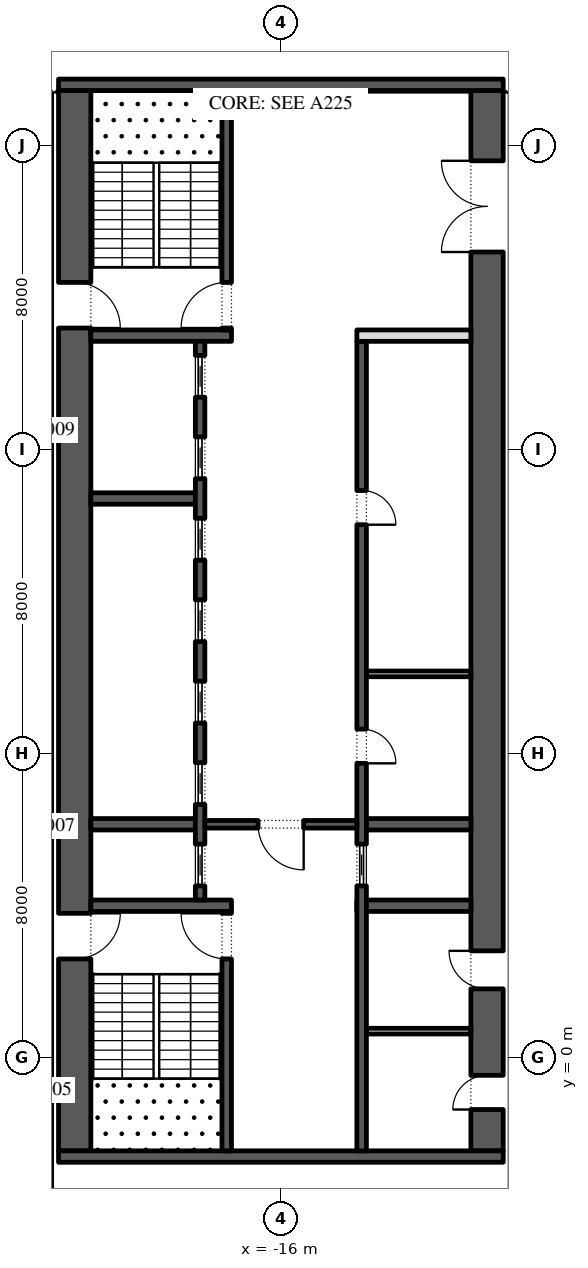
"""IFC4 building model, lengths in metres.
Left out: names, types, materials, properties, quantities, classifications, styles, units other than length and angle.
Written with IfcOpenShell. Run it as: python <this file> out.ifc"""

import sys

from ifc_helpers import new_model, si_unit, direction, frame, frame_2d, origin, place, context, subcontext, project, spatial, rectangle, extrude, element, fill, save


model = new_model("IFC4")
c1 = context("Model", 3, precision=1e-05, world=origin(), true_north=direction((0.0, 1.0)))
c2 = subcontext(c1, "Body", "Model", "MODEL_VIEW")
j1 = project(units=[si_unit("LENGTHUNIT", "METRE"), si_unit("PLANEANGLEUNIT", "RADIAN")], contexts=[c1])
p1 = place(None, origin())
s1 = spatial("IfcSite", under=j1, at=p1, CompositionType="ELEMENT")
p2 = place(p1, origin())
s2 = spatial("IfcBuilding", under=s1, at=p2, CompositionType="ELEMENT")
p3 = place(p2, frame((0.0, 0.0, 105.6)))
s3 = spatial("IfcBuildingStorey", under=s2, at=p3, CompositionType="ELEMENT", Elevation=105.6)
p4 = place(p3, frame((-21.425, -2.45, 0.0), z_axis=(0.0, 0.0, 1.0), x_axis=(0.0, 1.0, 0.0)))
e1 = element("IfcWall", 1, at=p4, inside=s3, PredefinedType="SHEAR", context=c2, shape_type="SweptSolid", body=[
    extrude(rectangle(XDim=27.9, YDim=0.85, at=frame_2d((13.95, 0.0))), origin(), (0.0, 0.0, 1.0), 4.0),
])
p5 = place(p4, frame((5.05, 0.0, 0.0)))
e2 = element("IfcOpeningElement", 2, at=p5, cuts=e1, PredefinedType="OPENING", context=c2, shape_type="SweptSolid", body=[
    extrude(rectangle(XDim=1.2, YDim=2.1, at=frame_2d((0.6, 1.05))), frame((0.0, 0.435, 0.0), z_axis=(0.0, -1.0, 0.0), x_axis=(1.0, 0.0, 0.0)), (0.0, 0.0, 1.0), 0.87),
])
p6 = place(p4, frame((21.65, 0.0, 0.0)))
e3 = element("IfcOpeningElement", 3, at=p6, cuts=e1, PredefinedType="OPENING", context=c2, shape_type="SweptSolid", body=[
    extrude(rectangle(XDim=1.2, YDim=2.1, at=frame_2d((0.6, 1.05))), frame((0.0, 0.435, 0.0), z_axis=(0.0, -1.0, 0.0), x_axis=(1.0, 0.0, 0.0)), (0.0, 0.0, 1.0), 0.87),
])
p7 = place(p3, frame((-10.575, -2.45, 0.0), z_axis=(0.0, 0.0, 1.0), x_axis=(0.0, 1.0, 0.0)))
e4 = element("IfcWall", 4, at=p7, inside=s3, PredefinedType="SHEAR", context=c2, shape_type="SweptSolid", body=[
    extrude(rectangle(XDim=27.9, YDim=0.85, at=frame_2d((13.95, 0.0))), origin(), (0.0, 0.0, 1.0), 4.0),
])
p8 = place(p7, frame((23.65, 0.0, 0.0)))
e5 = element("IfcOpeningElement", 5, at=p8, cuts=e4, PredefinedType="OPENING", context=c2, shape_type="SweptSolid", body=[
    extrude(rectangle(XDim=2.4, YDim=2.1, at=frame_2d((1.2, 1.05))), frame((0.0, 0.435, 0.0), z_axis=(0.0, -1.0, 0.0), x_axis=(1.0, 0.0, 0.0)), (0.0, 0.0, 1.0), 0.87),
])
p9 = place(p7, frame((1.087, 0.0, 0.0)))
e6 = element("IfcOpeningElement", 6, at=p9, cuts=e4, PredefinedType="OPENING", context=c2, shape_type="SweptSolid", body=[
    extrude(rectangle(XDim=0.9, YDim=2.1, at=frame_2d((0.45, 1.05))), frame((0.0, 0.435, 0.0), z_axis=(0.0, -1.0, 0.0), x_axis=(1.0, 0.0, 0.0)), (0.0, 0.0, 1.0), 0.87),
])
p10 = place(p7, frame((4.262, 0.0, 0.0)))
e7 = element("IfcOpeningElement", 7, at=p10, cuts=e4, PredefinedType="OPENING", context=c2, shape_type="SweptSolid", body=[
    extrude(rectangle(XDim=1.0, YDim=2.1, at=frame_2d((0.5, 1.05))), frame((0.0, 0.435, 0.0), z_axis=(0.0, -1.0, 0.0), x_axis=(1.0, 0.0, 0.0)), (0.0, 0.0, 1.0), 0.87),
])
for number, where, z_axis, x_axis in (
    (8, (-21.85, -2.6, 0.0), (0.0, 0.0, 1.0), (1.0, 0.0, 0.0)),
    (9, (-21.85, 25.6, 0.0), (0.0, 0.0, 1.0), (1.0, 0.0, 0.0)),
):
    element("IfcWall", number, at=place(p3, frame(where, z_axis=z_axis, x_axis=x_axis)), inside=s3, PredefinedType="SHEAR", context=c2, shape_type="SweptSolid", body=[
        extrude(rectangle(XDim=11.7, YDim=0.3, at=frame_2d((5.85, 0.0))), origin(), (0.0, 0.0, 1.0), 4.0),
    ])
p11 = place(p3, frame((-21.0, 4.0, 0.0), z_axis=(0.0, 0.0, 1.0), x_axis=(1.0, 0.0, 0.0)))
e10 = element("IfcWall", 10, at=p11, inside=s3, PredefinedType="SHEAR", context=c2, shape_type="SweptSolid", body=[
    extrude(rectangle(XDim=3.7, YDim=0.3, at=frame_2d((1.85, 0.0))), origin(), (0.0, 0.0, 1.0), 4.0),
])
p12 = place(p3, frame((-17.425, -2.45, 0.0), z_axis=(0.0, 0.0, 1.0), x_axis=(0.0, 1.0, 0.0)))
e11 = element("IfcWall", 11, at=p12, inside=s3, PredefinedType="SHEAR", context=c2, shape_type="SweptSolid", body=[
    extrude(rectangle(XDim=6.3, YDim=0.25, at=frame_2d((3.15, 0.0))), origin(), (0.0, 0.0, 1.0), 4.0),
])
p13 = place(p12, frame((5.05, 0.0, 0.0)))
e12 = element("IfcOpeningElement", 12, at=p13, cuts=e11, PredefinedType="OPENING", context=c2, shape_type="SweptSolid", body=[
    extrude(rectangle(XDim=1.2, YDim=2.1, at=frame_2d((0.6, 1.05))), frame((0.0, 0.135, 0.0), z_axis=(0.0, -1.0, 0.0), x_axis=(1.0, 0.0, 0.0)), (0.0, 0.0, 1.0), 0.27),
])
p14 = place(p3, frame((-21.0, 19.0, 0.0), z_axis=(0.0, 0.0, 1.0), x_axis=(1.0, 0.0, 0.0)))
e13 = element("IfcWall", 13, at=p14, inside=s3, PredefinedType="SHEAR", context=c2, shape_type="SweptSolid", body=[
    extrude(rectangle(XDim=3.7, YDim=0.3, at=frame_2d((1.85, 0.0))), origin(), (0.0, 0.0, 1.0), 4.0),
])
p15 = place(p3, frame((-17.425, 19.15, 0.0), z_axis=(0.0, 0.0, 1.0), x_axis=(0.0, 1.0, 0.0)))
e14 = element("IfcWall", 14, at=p15, inside=s3, PredefinedType="SHEAR", context=c2, shape_type="SweptSolid", body=[
    extrude(rectangle(XDim=6.3, YDim=0.25, at=frame_2d((3.15, 0.0))), origin(), (0.0, 0.0, 1.0), 4.0),
])
p16 = place(p15, frame((0.05, 0.0, 0.0)))
e15 = element("IfcOpeningElement", 15, at=p16, cuts=e14, PredefinedType="OPENING", context=c2, shape_type="SweptSolid", body=[
    extrude(rectangle(XDim=1.2, YDim=2.1, at=frame_2d((0.6, 1.05))), frame((0.0, 0.135, 0.0), z_axis=(0.0, -1.0, 0.0), x_axis=(1.0, 0.0, 0.0)), (0.0, 0.0, 1.0), 0.27),
])
for number, where, z_axis, x_axis in (
    (16, (-21.0, 6.143, 0.0), (0.0, 0.0, 1.0), (1.0, 0.0, 0.0)),
    (17, (-21.0, 14.714, 0.0), (0.0, 0.0, 1.0), (1.0, 0.0, 0.0)),
):
    element("IfcWall", number, at=place(p3, frame(where, z_axis=z_axis, x_axis=x_axis)), inside=s3, PredefinedType="SHEAR", context=c2, shape_type="SweptSolid", body=[
        extrude(rectangle(XDim=2.75, YDim=0.3, at=frame_2d((1.375, 0.0))), origin(), (0.0, 0.0, 1.0), 4.0),
    ])
p17 = place(p3, frame((-18.125, 4.15, 0.0), z_axis=(0.0, 0.0, 1.0), x_axis=(0.0, 1.0, 0.0)))
e18 = element("IfcWall", 18, at=p17, inside=s3, PredefinedType="SHEAR", context=c2, shape_type="SweptSolid", body=[
    extrude(rectangle(XDim=14.7, YDim=0.25, at=frame_2d((7.35, 0.0))), origin(), (0.0, 0.0, 1.0), 4.0),
])
p18 = place(p17, frame((0.371, 0.0, 0.0)))
e19 = element("IfcOpeningElement", 19, at=p18, cuts=e18, PredefinedType="OPENING", context=c2, shape_type="SweptSolid", body=[
    extrude(rectangle(XDim=1.1, YDim=2.1, at=frame_2d((0.55, 1.05))), frame((0.0, 0.135, 0.0), z_axis=(0.0, -1.0, 0.0), x_axis=(1.0, 0.0, 0.0)), (0.0, 0.0, 1.0), 0.27),
])
p19 = place(p17, frame((2.514, 0.0, 0.0)))
e20 = element("IfcOpeningElement", 20, at=p19, cuts=e18, PredefinedType="OPENING", context=c2, shape_type="SweptSolid", body=[
    extrude(rectangle(XDim=1.1, YDim=2.1, at=frame_2d((0.55, 1.05))), frame((0.0, 0.135, 0.0), z_axis=(0.0, -1.0, 0.0), x_axis=(1.0, 0.0, 0.0)), (0.0, 0.0, 1.0), 0.27),
])
p20 = place(p17, frame((4.657, 0.0, 0.0)))
e21 = element("IfcOpeningElement", 21, at=p20, cuts=e18, PredefinedType="OPENING", context=c2, shape_type="SweptSolid", body=[
    extrude(rectangle(XDim=1.1, YDim=2.1, at=frame_2d((0.55, 1.05))), frame((0.0, 0.135, 0.0), z_axis=(0.0, -1.0, 0.0), x_axis=(1.0, 0.0, 0.0)), (0.0, 0.0, 1.0), 0.27),
])
p21 = place(p17, frame((6.8, 0.0, 0.0)))
e22 = element("IfcOpeningElement", 22, at=p21, cuts=e18, PredefinedType="OPENING", context=c2, shape_type="SweptSolid", body=[
    extrude(rectangle(XDim=1.1, YDim=2.1, at=frame_2d((0.55, 1.05))), frame((0.0, 0.135, 0.0), z_axis=(0.0, -1.0, 0.0), x_axis=(1.0, 0.0, 0.0)), (0.0, 0.0, 1.0), 0.27),
])
p22 = place(p17, frame((8.943, 0.0, 0.0)))
e23 = element("IfcOpeningElement", 23, at=p22, cuts=e18, PredefinedType="OPENING", context=c2, shape_type="SweptSolid", body=[
    extrude(rectangle(XDim=1.1, YDim=2.1, at=frame_2d((0.55, 1.05))), frame((0.0, 0.135, 0.0), z_axis=(0.0, -1.0, 0.0), x_axis=(1.0, 0.0, 0.0)), (0.0, 0.0, 1.0), 0.27),
])
p23 = place(p17, frame((11.086, 0.0, 0.0)))
e24 = element("IfcOpeningElement", 24, at=p23, cuts=e18, PredefinedType="OPENING", context=c2, shape_type="SweptSolid", body=[
    extrude(rectangle(XDim=1.1, YDim=2.1, at=frame_2d((0.55, 1.05))), frame((0.0, 0.135, 0.0), z_axis=(0.0, -1.0, 0.0), x_axis=(1.0, 0.0, 0.0)), (0.0, 0.0, 1.0), 0.27),
])
p24 = place(p17, frame((13.229, 0.0, 0.0)))
e25 = element("IfcOpeningElement", 25, at=p24, cuts=e18, PredefinedType="OPENING", context=c2, shape_type="SweptSolid", body=[
    extrude(rectangle(XDim=1.1, YDim=2.1, at=frame_2d((0.55, 1.05))), frame((0.0, 0.135, 0.0), z_axis=(0.0, -1.0, 0.0), x_axis=(1.0, 0.0, 0.0)), (0.0, 0.0, 1.0), 0.27),
])
p25 = place(p3, frame((-14.0, 4.0, 0.0), z_axis=(0.0, 0.0, 1.0), x_axis=(1.0, 0.0, 0.0)))
e26 = element("IfcWall", 26, at=p25, inside=s3, PredefinedType="SHEAR", context=c2, shape_type="SweptSolid", body=[
    extrude(rectangle(XDim=3.0, YDim=0.3, at=frame_2d((1.5, 0.0))), origin(), (0.0, 0.0, 1.0), 4.0),
])
p26 = place(p3, frame((-13.75, 6.143, 0.0), z_axis=(0.0, 0.0, 1.0), x_axis=(1.0, 0.0, 0.0)))
e27 = element("IfcWall", 27, at=p26, inside=s3, PredefinedType="SHEAR", context=c2, shape_type="SweptSolid", body=[
    extrude(rectangle(XDim=2.75, YDim=0.3, at=frame_2d((1.375, 0.0))), origin(), (0.0, 0.0, 1.0), 4.0),
])
p27 = place(p3, frame((-13.875, -2.45, 0.0), z_axis=(0.0, 0.0, 1.0), x_axis=(0.0, 1.0, 0.0)))
e28 = element("IfcWall", 28, at=p27, inside=s3, PredefinedType="SHEAR", context=c2, shape_type="SweptSolid", body=[
    extrude(rectangle(XDim=21.3, YDim=0.25, at=frame_2d((10.65, 0.0))), origin(), (0.0, 0.0, 1.0), 4.0),
])
p28 = place(p27, frame((10.196, 0.0, 0.0)))
e29 = element("IfcOpeningElement", 29, at=p28, cuts=e28, PredefinedType="OPENING", context=c2, shape_type="SweptSolid", body=[
    extrude(rectangle(XDim=0.9, YDim=2.1, at=frame_2d((0.45, 1.05))), frame((0.0, 0.135, 0.0), z_axis=(0.0, -1.0, 0.0), x_axis=(1.0, 0.0, 0.0)), (0.0, 0.0, 1.0), 0.27),
])
p29 = place(p27, frame((16.475, 0.0, 0.0)))
e30 = element("IfcOpeningElement", 30, at=p29, cuts=e28, PredefinedType="OPENING", context=c2, shape_type="SweptSolid", body=[
    extrude(rectangle(XDim=0.9, YDim=2.1, at=frame_2d((0.45, 1.05))), frame((0.0, 0.135, 0.0), z_axis=(0.0, -1.0, 0.0), x_axis=(1.0, 0.0, 0.0)), (0.0, 0.0, 1.0), 0.27),
])
p30 = place(p27, frame((6.971, 0.0, 0.0)))
e31 = element("IfcOpeningElement", 31, at=p30, cuts=e28, PredefinedType="OPENING", context=c2, shape_type="SweptSolid", body=[
    extrude(rectangle(XDim=1.1, YDim=2.1, at=frame_2d((0.55, 1.05))), frame((0.0, 0.135, 0.0), z_axis=(0.0, -1.0, 0.0), x_axis=(1.0, 0.0, 0.0)), (0.0, 0.0, 1.0), 0.27),
])
p31 = place(p3, frame((-14.0, 19.0, 0.0), z_axis=(0.0, 0.0, 1.0), x_axis=(1.0, 0.0, 0.0)))
e32 = element("IfcWall", 32, at=p31, inside=s3, PredefinedType="PARTITIONING", context=c2, shape_type="SweptSolid", body=[
    extrude(rectangle(XDim=3.0, YDim=0.3, at=frame_2d((1.5, 0.0))), origin(), (0.0, 0.0, 1.0), 4.0),
])
p32 = place(p3, frame((-13.75, 10.1, 0.0), z_axis=(0.0, 0.0, 1.0), x_axis=(1.0, 0.0, 0.0)))
e33 = element("IfcWall", 33, at=p32, inside=s3, PredefinedType="PARTITIONING", context=c2, shape_type="SweptSolid", body=[
    extrude(rectangle(XDim=2.75, YDim=0.15, at=frame_2d((1.375, 0.0))), origin(), (0.0, 0.0, 1.0), 4.0),
])
p33 = place(p3, frame((-18.0, 6.143, 0.0), z_axis=(0.0, 0.0, 1.0), x_axis=(1.0, 0.0, 0.0)))
e34 = element("IfcWall", 34, at=p33, inside=s3, PredefinedType="SHEAR", context=c2, shape_type="SweptSolid", body=[
    extrude(rectangle(XDim=4.0, YDim=0.2, at=frame_2d((2.0, 0.0))), origin(), (0.0, 0.0, 1.0), 4.0),
])
p34 = place(p33, frame((1.4, 0.0, 0.0)))
e35 = element("IfcOpeningElement", 35, at=p34, cuts=e34, PredefinedType="OPENING", context=c2, shape_type="SweptSolid", body=[
    extrude(rectangle(XDim=1.2, YDim=2.1, at=frame_2d((0.6, 1.05))), frame((0.0, 0.11, 0.0), z_axis=(0.0, -1.0, 0.0), x_axis=(1.0, 0.0, 0.0)), (0.0, 0.0, 1.0), 0.22),
])
p35 = place(p3, frame((-13.75, 0.7, 0.0), z_axis=(0.0, 0.0, 1.0), x_axis=(1.0, 0.0, 0.0)))
e36 = element("IfcWall", 36, at=p35, inside=s3, PredefinedType="PARTITIONING", context=c2, shape_type="SweptSolid", body=[
    extrude(rectangle(XDim=2.75, YDim=0.15, at=frame_2d((1.375, 0.0))), origin(), (0.0, 0.0, 1.0), 4.0),
])
p36 = place(p18, origin())
e37 = element("IfcDoor", 37, at=p36, inside=s3, OperationType="SLIDING_TO_LEFT", PredefinedType="DOOR", context=c2, shape_type="SweptSolid", body=[
    extrude(rectangle(XDim=1.1, YDim=2.1, at=frame_2d((0.55, 1.05))), frame((0.0, 0.025, 0.0), z_axis=(0.0, -1.0, 0.0), x_axis=(1.0, 0.0, 0.0)), (0.0, 0.0, 1.0), 0.05),
])
fill(e19, e37)
p37 = place(p19, origin())
e38 = element("IfcDoor", 38, at=p37, inside=s3, OperationType="SLIDING_TO_LEFT", PredefinedType="DOOR", context=c2, shape_type="SweptSolid", body=[
    extrude(rectangle(XDim=1.1, YDim=2.1, at=frame_2d((0.55, 1.05))), frame((0.0, 0.025, 0.0), z_axis=(0.0, -1.0, 0.0), x_axis=(1.0, 0.0, 0.0)), (0.0, 0.0, 1.0), 0.05),
])
fill(e20, e38)
p38 = place(p20, origin())
e39 = element("IfcDoor", 39, at=p38, inside=s3, OperationType="SLIDING_TO_LEFT", PredefinedType="DOOR", context=c2, shape_type="SweptSolid", body=[
    extrude(rectangle(XDim=1.1, YDim=2.1, at=frame_2d((0.55, 1.05))), frame((0.0, 0.025, 0.0), z_axis=(0.0, -1.0, 0.0), x_axis=(1.0, 0.0, 0.0)), (0.0, 0.0, 1.0), 0.05),
])
fill(e21, e39)
p39 = place(p21, origin())
e40 = element("IfcDoor", 40, at=p39, inside=s3, OperationType="SLIDING_TO_LEFT", PredefinedType="DOOR", context=c2, shape_type="SweptSolid", body=[
    extrude(rectangle(XDim=1.1, YDim=2.1, at=frame_2d((0.55, 1.05))), frame((0.0, 0.025, 0.0), z_axis=(0.0, -1.0, 0.0), x_axis=(1.0, 0.0, 0.0)), (0.0, 0.0, 1.0), 0.05),
])
fill(e22, e40)
p40 = place(p22, origin())
e41 = element("IfcDoor", 41, at=p40, inside=s3, OperationType="SLIDING_TO_LEFT", PredefinedType="DOOR", context=c2, shape_type="SweptSolid", body=[
    extrude(rectangle(XDim=1.1, YDim=2.1, at=frame_2d((0.55, 1.05))), frame((0.0, 0.025, 0.0), z_axis=(0.0, -1.0, 0.0), x_axis=(1.0, 0.0, 0.0)), (0.0, 0.0, 1.0), 0.05),
])
fill(e23, e41)
p41 = place(p23, origin())
e42 = element("IfcDoor", 42, at=p41, inside=s3, OperationType="SLIDING_TO_LEFT", PredefinedType="DOOR", context=c2, shape_type="SweptSolid", body=[
    extrude(rectangle(XDim=1.1, YDim=2.1, at=frame_2d((0.55, 1.05))), frame((0.0, 0.025, 0.0), z_axis=(0.0, -1.0, 0.0), x_axis=(1.0, 0.0, 0.0)), (0.0, 0.0, 1.0), 0.05),
])
fill(e24, e42)
p42 = place(p24, origin())
e43 = element("IfcDoor", 43, at=p42, inside=s3, OperationType="SLIDING_TO_LEFT", PredefinedType="DOOR", context=c2, shape_type="SweptSolid", body=[
    extrude(rectangle(XDim=1.1, YDim=2.1, at=frame_2d((0.55, 1.05))), frame((0.0, 0.025, 0.0), z_axis=(0.0, -1.0, 0.0), x_axis=(1.0, 0.0, 0.0)), (0.0, 0.0, 1.0), 0.05),
])
fill(e25, e43)
p43 = place(p28, frame((0.9, -0.2, 0.0), z_axis=(0.0, 0.0, 1.0), x_axis=(-1.0, 0.0, 0.0)))
e44 = element("IfcDoor", 44, at=p43, inside=s3, OperationType="SINGLE_SWING_LEFT", PredefinedType="DOOR", context=c2, shape_type="SweptSolid", body=[
    extrude(rectangle(XDim=0.9, YDim=2.1, at=frame_2d((0.45, 1.05))), frame((0.0, -0.075, 0.0), z_axis=(0.0, -1.0, 0.0), x_axis=(1.0, 0.0, 0.0)), (0.0, 0.0, 1.0), 0.05),
])
fill(e29, e44)
p44 = place(p29, frame((0.9, -0.2, 0.0), z_axis=(0.0, 0.0, 1.0), x_axis=(-1.0, 0.0, 0.0)))
e45 = element("IfcDoor", 45, at=p44, inside=s3, OperationType="SINGLE_SWING_LEFT", PredefinedType="DOOR", context=c2, shape_type="SweptSolid", body=[
    extrude(rectangle(XDim=0.9, YDim=2.1, at=frame_2d((0.45, 1.05))), frame((0.0, -0.075, 0.0), z_axis=(0.0, -1.0, 0.0), x_axis=(1.0, 0.0, 0.0)), (0.0, 0.0, 1.0), 0.05),
])
fill(e30, e45)
p45 = place(p30, origin())
e46 = element("IfcDoor", 46, at=p45, inside=s3, OperationType="SLIDING_TO_LEFT", PredefinedType="DOOR", context=c2, shape_type="SweptSolid", body=[
    extrude(rectangle(XDim=1.1, YDim=2.1, at=frame_2d((0.55, 1.05))), frame((0.0, 0.025, 0.0), z_axis=(0.0, -1.0, 0.0), x_axis=(1.0, 0.0, 0.0)), (0.0, 0.0, 1.0), 0.05),
])
fill(e31, e46)
p46 = place(p34, frame((1.2, 0.0, 0.0), z_axis=(0.0, 0.0, 1.0), x_axis=(-1.0, 0.0, 0.0)))
e47 = element("IfcDoor", 47, at=p46, inside=s3, OperationType="SINGLE_SWING_RIGHT", PredefinedType="DOOR", context=c2, shape_type="SweptSolid", body=[
    extrude(rectangle(XDim=1.2, YDim=2.1, at=frame_2d((0.6, 1.05))), frame((0.0, 0.025, 0.0), z_axis=(0.0, -1.0, 0.0), x_axis=(1.0, 0.0, 0.0)), (0.0, 0.0, 1.0), 0.05),
])
fill(e35, e47)
p47 = place(p8, origin())
e48 = element("IfcDoor", 48, at=p47, inside=s3, OperationType="DOUBLE_DOOR_SINGLE_SWING", PredefinedType="DOOR", context=c2, shape_type="SweptSolid", body=[
    extrude(rectangle(XDim=2.4, YDim=2.1, at=frame_2d((1.2, 1.05))), frame((0.0, 0.025, 0.0), z_axis=(0.0, -1.0, 0.0), x_axis=(1.0, 0.0, 0.0)), (0.0, 0.0, 1.0), 0.05),
])
fill(e5, e48)
p48 = place(p13, origin())
e49 = element("IfcDoor", 49, at=p48, inside=s3, OperationType="SINGLE_SWING_LEFT", PredefinedType="DOOR", context=c2, shape_type="SweptSolid", body=[
    extrude(rectangle(XDim=1.2, YDim=2.1, at=frame_2d((0.6, 1.05))), frame((0.0, 0.025, 0.0), z_axis=(0.0, -1.0, 0.0), x_axis=(1.0, 0.0, 0.0)), (0.0, 0.0, 1.0), 0.05),
])
fill(e12, e49)
p49 = place(p5, frame((1.2, 0.0, 0.0), z_axis=(0.0, 0.0, 1.0), x_axis=(-1.0, 0.0, 0.0)))
e50 = element("IfcDoor", 50, at=p49, inside=s3, OperationType="SINGLE_SWING_RIGHT", PredefinedType="DOOR", context=c2, shape_type="SweptSolid", body=[
    extrude(rectangle(XDim=1.2, YDim=2.1, at=frame_2d((0.6, 1.05))), frame((0.0, 0.025, 0.0), z_axis=(0.0, -1.0, 0.0), x_axis=(1.0, 0.0, 0.0)), (0.0, 0.0, 1.0), 0.05),
])
fill(e2, e50)
p50 = place(p16, origin())
e51 = element("IfcDoor", 51, at=p50, inside=s3, OperationType="SINGLE_SWING_RIGHT", PredefinedType="DOOR", context=c2, shape_type="SweptSolid", body=[
    extrude(rectangle(XDim=1.2, YDim=2.1, at=frame_2d((0.6, 1.05))), frame((0.0, 0.025, 0.0), z_axis=(0.0, -1.0, 0.0), x_axis=(1.0, 0.0, 0.0)), (0.0, 0.0, 1.0), 0.05),
])
fill(e15, e51)
p51 = place(p6, frame((1.2, 0.0, 0.0), z_axis=(0.0, 0.0, 1.0), x_axis=(-1.0, 0.0, 0.0)))
e52 = element("IfcDoor", 52, at=p51, inside=s3, OperationType="SINGLE_SWING_LEFT", PredefinedType="DOOR", context=c2, shape_type="SweptSolid", body=[
    extrude(rectangle(XDim=1.2, YDim=2.1, at=frame_2d((0.6, 1.05))), frame((0.0, 0.025, 0.0), z_axis=(0.0, -1.0, 0.0), x_axis=(1.0, 0.0, 0.0)), (0.0, 0.0, 1.0), 0.05),
])
fill(e3, e52)
p52 = place(p9, origin())
e53 = element("IfcDoor", 53, at=p52, inside=s3, OperationType="SINGLE_SWING_RIGHT", PredefinedType="DOOR", context=c2, shape_type="SweptSolid", body=[
    extrude(rectangle(XDim=0.9, YDim=2.1, at=frame_2d((0.45, 1.05))), frame((0.0, 0.425, 0.0), z_axis=(0.0, -1.0, 0.0), x_axis=(1.0, 0.0, 0.0)), (0.0, 0.0, 1.0), 0.05),
])
fill(e6, e53)
p53 = place(p10, origin())
e54 = element("IfcDoor", 54, at=p53, inside=s3, OperationType="SINGLE_SWING_LEFT", PredefinedType="DOOR", context=c2, shape_type="SweptSolid", body=[
    extrude(rectangle(XDim=1.0, YDim=2.1, at=frame_2d((0.5, 1.05))), frame((0.0, 0.425, 0.0), z_axis=(0.0, -1.0, 0.0), x_axis=(1.0, 0.0, 0.0)), (0.0, 0.0, 1.0), 0.05),
])
fill(e7, e54)
save(model, sys.argv[1])
